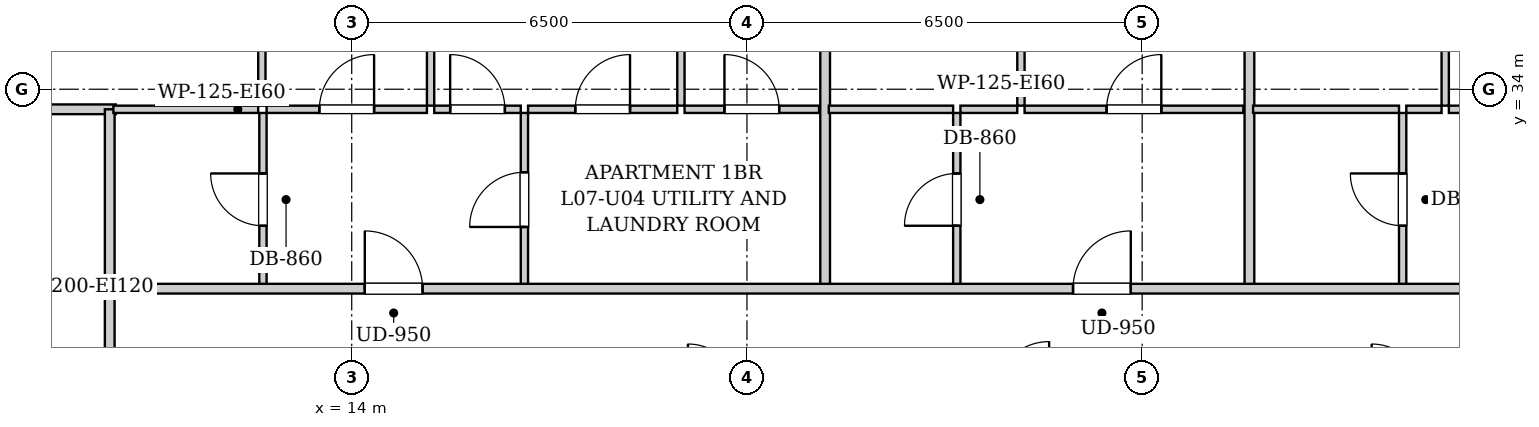
"""IFC4 building model, lengths in metres.
Left out: names, types, materials, properties, quantities, classifications, styles, units other than length and angle.
Written with IfcOpenShell. Run it as: python <this file> out.ifc"""

import sys

from ifc_helpers import new_model, si_unit, direction, frame, frame_2d, origin, place, context, subcontext, project, spatial, rectangle, extrude, element, fill, save


model = new_model("IFC4")
c1 = context("Model", 3, precision=1e-05, world=origin(), true_north=direction((0.0, 1.0)))
c2 = subcontext(c1, "Body", "Model", "MODEL_VIEW")
j1 = project(units=[si_unit("LENGTHUNIT", "METRE"), si_unit("PLANEANGLEUNIT", "RADIAN")], contexts=[c1])
p1 = place(None, origin())
s1 = spatial("IfcSite", under=j1, at=p1, CompositionType="ELEMENT")
p2 = place(p1, origin())
s2 = spatial("IfcBuilding", under=s1, at=p2, CompositionType="ELEMENT")
p3 = place(p2, frame((0.0, 0.0, 32.2)))
s3 = spatial("IfcBuildingStorey", under=s2, at=p3, CompositionType="ELEMENT", Elevation=32.2)
p4 = place(p3, frame((10.02, 28.98, 0.0), z_axis=(0.0, 0.0, 1.0), x_axis=(0.0, 1.0, 0.0)))
e1 = element("IfcWall", 1, at=p4, inside=s3, PredefinedType="PARTITIONING", context=c2, shape_type="SweptSolid", body=[
    extrude(rectangle(XDim=1.74, YDim=0.16, at=frame_2d((0.87, 0.0))), origin(), (0.0, 0.0, 1.0), 2.94),
])
p5 = place(p3, frame((7.78, 33.67, 0.0), z_axis=(0.0, 0.0, 1.0), x_axis=(1.0, 0.0, 0.0)))
e2 = element("IfcWall", 2, at=p5, inside=s3, PredefinedType="PARTITIONING", context=c2, shape_type="SweptSolid", body=[
    extrude(rectangle(XDim=2.34, YDim=0.16, at=frame_2d((1.17, 0.0))), origin(), (0.0, 0.0, 1.0), 2.94),
])
p6 = place(p3, frame((10.02, 30.76, 0.0), z_axis=(0.0, 0.0, 1.0), x_axis=(0.0, 1.0, 0.0)))
e3 = element("IfcWall", 3, at=p6, inside=s3, PredefinedType="PARTITIONING", context=c2, shape_type="SweptSolid", body=[
    extrude(rectangle(XDim=2.91, YDim=0.16, at=frame_2d((1.455, 0.0))), origin(), (0.0, 0.0, 1.0), 2.94),
])
p7 = place(p3, frame((12.54, 30.76, 0.0), z_axis=(0.0, 0.0, 1.0), x_axis=(0.0, 1.0, 0.0)))
e4 = element("IfcWall", 4, at=p7, inside=s3, PredefinedType="PARTITIONING", context=c2, shape_type="SweptSolid", body=[
    extrude(rectangle(XDim=2.85, YDim=0.12, at=frame_2d((1.425, 0.0))), origin(), (0.0, 0.0, 1.0), 2.94),
])
p8 = place(p7, frame((0.995, 0.0, 0.0)))
e5 = element("IfcOpeningElement", 5, at=p8, cuts=e4, PredefinedType="OPENING", context=c2, shape_type="SweptSolid", body=[
    extrude(rectangle(XDim=0.86, YDim=2.05, at=frame_2d((0.43, 1.025))), frame((0.0, 0.07, 0.0), z_axis=(0.0, -1.0, 0.0), x_axis=(1.0, 0.0, 0.0)), (0.0, 0.0, 1.0), 0.14),
])
p9 = place(p3, frame((10.08, 33.67, 0.0), z_axis=(0.0, 0.0, 1.0), x_axis=(1.0, 0.0, 0.0)))
e6 = element("IfcWall", 6, at=p9, inside=s3, PredefinedType="PARTITIONING", context=c2, shape_type="SweptSolid", body=[
    extrude(rectangle(XDim=2.382, YDim=0.12, at=frame_2d((1.191, 0.0))), origin(), (0.0, 0.0, 1.0), 2.94),
])
p10 = place(p3, frame((16.84, 30.76, 0.0), z_axis=(0.0, 0.0, 1.0), x_axis=(0.0, 1.0, 0.0)))
e7 = element("IfcWall", 7, at=p10, inside=s3, PredefinedType="PARTITIONING", context=c2, shape_type="SweptSolid", body=[
    extrude(rectangle(XDim=2.85, YDim=0.12, at=frame_2d((1.425, 0.0))), origin(), (0.0, 0.0, 1.0), 2.94),
])
p11 = place(p10, frame((0.975, 0.0, 0.0)))
e8 = element("IfcOpeningElement", 8, at=p11, cuts=e7, PredefinedType="OPENING", context=c2, shape_type="SweptSolid", body=[
    extrude(rectangle(XDim=0.9, YDim=2.05, at=frame_2d((0.45, 1.025))), frame((0.0, 0.07, 0.0), z_axis=(0.0, -1.0, 0.0), x_axis=(1.0, 0.0, 0.0)), (0.0, 0.0, 1.0), 0.14),
])
p12 = place(p3, frame((12.6, 33.67, 0.0), z_axis=(0.0, 0.0, 1.0), x_axis=(1.0, 0.0, 0.0)))
e9 = element("IfcWall", 9, at=p12, inside=s3, PredefinedType="PARTITIONING", context=c2, shape_type="SweptSolid", body=[
    extrude(rectangle(XDim=2.637, YDim=0.12, at=frame_2d((1.318, 0.0))), origin(), (0.0, 0.0, 1.0), 2.94),
])
p13 = place(p12, frame((0.868, 0.0, 0.0)))
e10 = element("IfcOpeningElement", 10, at=p13, cuts=e9, PredefinedType="OPENING", context=c2, shape_type="SweptSolid", body=[
    extrude(rectangle(XDim=0.9, YDim=2.05, at=frame_2d((0.45, 1.025))), frame((0.0, 0.07, 0.0), z_axis=(0.0, -1.0, 0.0), x_axis=(1.0, 0.0, 0.0)), (0.0, 0.0, 1.0), 0.14),
])
p14 = place(p3, frame((15.357, 33.67, 0.0), z_axis=(0.0, 0.0, 1.0), x_axis=(1.0, 0.0, 0.0)))
e11 = element("IfcWall", 11, at=p14, inside=s3, PredefinedType="PARTITIONING", context=c2, shape_type="SweptSolid", body=[
    extrude(rectangle(XDim=1.423, YDim=0.12, at=frame_2d((0.711, 0.0))), origin(), (0.0, 0.0, 1.0), 2.94),
])
p15 = place(p14, frame((0.262, 0.0, 0.0)))
e12 = element("IfcOpeningElement", 12, at=p15, cuts=e11, PredefinedType="OPENING", context=c2, shape_type="SweptSolid", body=[
    extrude(rectangle(XDim=0.9, YDim=2.05, at=frame_2d((0.45, 1.025))), frame((0.0, 0.07, 0.0), z_axis=(0.0, -1.0, 0.0), x_axis=(1.0, 0.0, 0.0)), (0.0, 0.0, 1.0), 0.14),
])
p16 = place(p3, frame((16.9, 33.67, 0.0), z_axis=(0.0, 0.0, 1.0), x_axis=(1.0, 0.0, 0.0)))
e13 = element("IfcWall", 13, at=p16, inside=s3, PredefinedType="PARTITIONING", context=c2, shape_type="SweptSolid", body=[
    extrude(rectangle(XDim=2.454, YDim=0.12, at=frame_2d((1.227, 0.0))), origin(), (0.0, 0.0, 1.0), 2.94),
])
p17 = place(p16, frame((0.777, 0.0, 0.0)))
e14 = element("IfcOpeningElement", 14, at=p17, cuts=e13, PredefinedType="OPENING", context=c2, shape_type="SweptSolid", body=[
    extrude(rectangle(XDim=0.9, YDim=2.05, at=frame_2d((0.45, 1.025))), frame((0.0, 0.07, 0.0), z_axis=(0.0, -1.0, 0.0), x_axis=(1.0, 0.0, 0.0)), (0.0, 0.0, 1.0), 0.14),
])
p18 = place(p3, frame((19.474, 33.67, 0.0), z_axis=(0.0, 0.0, 1.0), x_axis=(1.0, 0.0, 0.0)))
e15 = element("IfcWall", 15, at=p18, inside=s3, PredefinedType="PARTITIONING", context=c2, shape_type="SweptSolid", body=[
    extrude(rectangle(XDim=2.212, YDim=0.12, at=frame_2d((1.106, 0.0))), origin(), (0.0, 0.0, 1.0), 2.94),
])
p19 = place(p18, frame((0.656, 0.0, 0.0)))
e16 = element("IfcOpeningElement", 16, at=p19, cuts=e15, PredefinedType="OPENING", context=c2, shape_type="SweptSolid", body=[
    extrude(rectangle(XDim=0.9, YDim=2.05, at=frame_2d((0.45, 1.025))), frame((0.0, 0.07, 0.0), z_axis=(0.0, -1.0, 0.0), x_axis=(1.0, 0.0, 0.0)), (0.0, 0.0, 1.0), 0.14),
])
p20 = place(p3, frame((12.522, 33.73, 0.0), z_axis=(0.0, 0.0, 1.0), x_axis=(0.0, 1.0, 0.0)))
e17 = element("IfcWall", 17, at=p20, inside=s3, PredefinedType="PARTITIONING", context=c2, shape_type="SweptSolid", body=[
    extrude(rectangle(XDim=13.59, YDim=0.12, at=frame_2d((6.795, 0.0))), origin(), (0.0, 0.0, 1.0), 2.94),
])
p21 = place(p20, frame((6.33, 0.0, 0.0)))
e18 = element("IfcOpeningElement", 18, at=p21, cuts=e17, PredefinedType="OPENING", context=c2, shape_type="SweptSolid", body=[
    extrude(rectangle(XDim=0.9, YDim=2.05, at=frame_2d((0.45, 1.025))), frame((0.0, 0.07, 0.0), z_axis=(0.0, -1.0, 0.0), x_axis=(1.0, 0.0, 0.0)), (0.0, 0.0, 1.0), 0.14),
])
p22 = place(p3, frame((15.297, 33.73, 0.0), z_axis=(0.0, 0.0, 1.0), x_axis=(0.0, 1.0, 0.0)))
e19 = element("IfcWall", 19, at=p22, inside=s3, PredefinedType="PARTITIONING", context=c2, shape_type="SweptSolid", body=[
    extrude(rectangle(XDim=13.59, YDim=0.12, at=frame_2d((6.795, 0.0))), origin(), (0.0, 0.0, 1.0), 2.94),
])
p23 = place(p22, frame((6.33, 0.0, 0.0)))
e20 = element("IfcOpeningElement", 20, at=p23, cuts=e19, PredefinedType="OPENING", context=c2, shape_type="SweptSolid", body=[
    extrude(rectangle(XDim=0.9, YDim=2.05, at=frame_2d((0.45, 1.025))), frame((0.0, 0.07, 0.0), z_axis=(0.0, -1.0, 0.0), x_axis=(1.0, 0.0, 0.0)), (0.0, 0.0, 1.0), 0.14),
])
p24 = place(p3, frame((19.414, 33.73, 0.0), z_axis=(0.0, 0.0, 1.0), x_axis=(0.0, 1.0, 0.0)))
e21 = element("IfcWall", 21, at=p24, inside=s3, PredefinedType="PARTITIONING", context=c2, shape_type="SweptSolid", body=[
    extrude(rectangle(XDim=13.59, YDim=0.12, at=frame_2d((6.795, 0.0))), origin(), (0.0, 0.0, 1.0), 2.94),
])
p25 = place(p24, frame((6.33, 0.0, 0.0)))
e22 = element("IfcOpeningElement", 22, at=p25, cuts=e21, PredefinedType="OPENING", context=c2, shape_type="SweptSolid", body=[
    extrude(rectangle(XDim=0.9, YDim=2.05, at=frame_2d((0.45, 1.025))), frame((0.0, 0.07, 0.0), z_axis=(0.0, -1.0, 0.0), x_axis=(1.0, 0.0, 0.0)), (0.0, 0.0, 1.0), 0.14),
])
p26 = place(p3, frame((21.786, 30.76, 0.0), z_axis=(0.0, 0.0, 1.0), x_axis=(0.0, 1.0, 0.0)))
e23 = element("IfcWall", 23, at=p26, inside=s3, PredefinedType="PARTITIONING", context=c2, shape_type="SweptSolid", body=[
    extrude(rectangle(XDim=16.56, YDim=0.16, at=frame_2d((8.28, 0.0))), origin(), (0.0, 0.0, 1.0), 2.94),
])
p27 = place(p3, frame((23.951, 30.76, 0.0), z_axis=(0.0, 0.0, 1.0), x_axis=(0.0, 1.0, 0.0)))
e24 = element("IfcWall", 24, at=p27, inside=s3, PredefinedType="PARTITIONING", context=c2, shape_type="SweptSolid", body=[
    extrude(rectangle(XDim=2.85, YDim=0.12, at=frame_2d((1.425, 0.0))), origin(), (0.0, 0.0, 1.0), 2.94),
])
p28 = place(p27, frame((0.995, 0.0, 0.0)))
e25 = element("IfcOpeningElement", 25, at=p28, cuts=e24, PredefinedType="OPENING", context=c2, shape_type="SweptSolid", body=[
    extrude(rectangle(XDim=0.86, YDim=2.05, at=frame_2d((0.43, 1.025))), frame((0.0, 0.07, 0.0), z_axis=(0.0, -1.0, 0.0), x_axis=(1.0, 0.0, 0.0)), (0.0, 0.0, 1.0), 0.14),
])
p29 = place(p3, frame((21.846, 33.67, 0.0), z_axis=(0.0, 0.0, 1.0), x_axis=(1.0, 0.0, 0.0)))
e26 = element("IfcWall", 26, at=p29, inside=s3, PredefinedType="PARTITIONING", context=c2, shape_type="SweptSolid", body=[
    extrude(rectangle(XDim=2.045, YDim=0.12, at=frame_2d((1.022, 0.0))), origin(), (0.0, 0.0, 1.0), 2.94),
])
p30 = place(p3, frame((24.011, 33.67, 0.0), z_axis=(0.0, 0.0, 1.0), x_axis=(1.0, 0.0, 0.0)))
e27 = element("IfcWall", 27, at=p30, inside=s3, PredefinedType="PARTITIONING", context=c2, shape_type="SweptSolid", body=[
    extrude(rectangle(XDim=0.935, YDim=0.12, at=frame_2d((0.468, 0.0))), origin(), (0.0, 0.0, 1.0), 2.94),
])
p31 = place(p3, frame((25.066, 33.67, 0.0), z_axis=(0.0, 0.0, 1.0), x_axis=(1.0, 0.0, 0.0)))
e28 = element("IfcWall", 28, at=p31, inside=s3, PredefinedType="PARTITIONING", context=c2, shape_type="SweptSolid", body=[
    extrude(rectangle(XDim=3.598, YDim=0.12, at=frame_2d((1.799, 0.0))), origin(), (0.0, 0.0, 1.0), 2.94),
])
p32 = place(p31, frame((1.349, 0.0, 0.0)))
e29 = element("IfcOpeningElement", 29, at=p32, cuts=e28, PredefinedType="OPENING", context=c2, shape_type="SweptSolid", body=[
    extrude(rectangle(XDim=0.9, YDim=2.05, at=frame_2d((0.45, 1.025))), frame((0.0, 0.07, 0.0), z_axis=(0.0, -1.0, 0.0), x_axis=(1.0, 0.0, 0.0)), (0.0, 0.0, 1.0), 0.14),
])
p33 = place(p3, frame((25.006, 33.73, 0.0), z_axis=(0.0, 0.0, 1.0), x_axis=(0.0, 1.0, 0.0)))
e30 = element("IfcWall", 30, at=p33, inside=s3, PredefinedType="PARTITIONING", context=c2, shape_type="SweptSolid", body=[
    extrude(rectangle(XDim=13.59, YDim=0.12, at=frame_2d((6.795, 0.0))), origin(), (0.0, 0.0, 1.0), 2.94),
])
p34 = place(p33, frame((6.33, 0.0, 0.0)))
e31 = element("IfcOpeningElement", 31, at=p34, cuts=e30, PredefinedType="OPENING", context=c2, shape_type="SweptSolid", body=[
    extrude(rectangle(XDim=0.9, YDim=2.05, at=frame_2d((0.45, 1.025))), frame((0.0, 0.07, 0.0), z_axis=(0.0, -1.0, 0.0), x_axis=(1.0, 0.0, 0.0)), (0.0, 0.0, 1.0), 0.14),
])
p35 = place(p3, frame((28.764, 30.76, 0.0), z_axis=(0.0, 0.0, 1.0), x_axis=(0.0, 1.0, 0.0)))
e32 = element("IfcWall", 32, at=p35, inside=s3, PredefinedType="PARTITIONING", context=c2, shape_type="SweptSolid", body=[
    extrude(rectangle(XDim=16.56, YDim=0.16, at=frame_2d((8.28, 0.0))), origin(), (0.0, 0.0, 1.0), 2.94),
])
p36 = place(p3, frame((31.284, 30.76, 0.0), z_axis=(0.0, 0.0, 1.0), x_axis=(0.0, 1.0, 0.0)))
e33 = element("IfcWall", 33, at=p36, inside=s3, PredefinedType="PARTITIONING", context=c2, shape_type="SweptSolid", body=[
    extrude(rectangle(XDim=2.85, YDim=0.12, at=frame_2d((1.425, 0.0))), origin(), (0.0, 0.0, 1.0), 2.94),
])
p37 = place(p36, frame((0.995, 0.0, 0.0)))
e34 = element("IfcOpeningElement", 34, at=p37, cuts=e33, PredefinedType="OPENING", context=c2, shape_type="SweptSolid", body=[
    extrude(rectangle(XDim=0.86, YDim=2.05, at=frame_2d((0.43, 1.025))), frame((0.0, 0.07, 0.0), z_axis=(0.0, -1.0, 0.0), x_axis=(1.0, 0.0, 0.0)), (0.0, 0.0, 1.0), 0.14),
])
p38 = place(p3, frame((28.824, 33.67, 0.0), z_axis=(0.0, 0.0, 1.0), x_axis=(1.0, 0.0, 0.0)))
e35 = element("IfcWall", 35, at=p38, inside=s3, PredefinedType="PARTITIONING", context=c2, shape_type="SweptSolid", body=[
    extrude(rectangle(XDim=2.4, YDim=0.12, at=frame_2d((1.2, 0.0))), origin(), (0.0, 0.0, 1.0), 2.94),
])
p39 = place(p3, frame((31.344, 33.67, 0.0), z_axis=(0.0, 0.0, 1.0), x_axis=(1.0, 0.0, 0.0)))
e36 = element("IfcWall", 36, at=p39, inside=s3, PredefinedType="PARTITIONING", context=c2, shape_type="SweptSolid", body=[
    extrude(rectangle(XDim=0.58, YDim=0.12, at=frame_2d((0.29, 0.0))), origin(), (0.0, 0.0, 1.0), 2.94),
])
p40 = place(p3, frame((32.044, 33.67, 0.0), z_axis=(0.0, 0.0, 1.0), x_axis=(1.0, 0.0, 0.0)))
e37 = element("IfcWall", 37, at=p40, inside=s3, PredefinedType="PARTITIONING", context=c2, shape_type="SweptSolid", body=[
    extrude(rectangle(XDim=3.1, YDim=0.12, at=frame_2d((1.55, 0.0))), origin(), (0.0, 0.0, 1.0), 2.94),
])
p41 = place(p40, frame((1.1, 0.0, 0.0)))
e38 = element("IfcOpeningElement", 38, at=p41, cuts=e37, PredefinedType="OPENING", context=c2, shape_type="SweptSolid", body=[
    extrude(rectangle(XDim=0.9, YDim=2.05, at=frame_2d((0.45, 1.025))), frame((0.0, 0.07, 0.0), z_axis=(0.0, -1.0, 0.0), x_axis=(1.0, 0.0, 0.0)), (0.0, 0.0, 1.0), 0.14),
])
p42 = place(p3, frame((31.984, 33.73, 0.0), z_axis=(0.0, 0.0, 1.0), x_axis=(0.0, 1.0, 0.0)))
e39 = element("IfcWall", 39, at=p42, inside=s3, PredefinedType="PARTITIONING", context=c2, shape_type="SweptSolid", body=[
    extrude(rectangle(XDim=13.59, YDim=0.12, at=frame_2d((6.795, 0.0))), origin(), (0.0, 0.0, 1.0), 2.94),
])
p43 = place(p42, frame((6.33, 0.0, 0.0)))
e40 = element("IfcOpeningElement", 40, at=p43, cuts=e39, PredefinedType="OPENING", context=c2, shape_type="SweptSolid", body=[
    extrude(rectangle(XDim=0.9, YDim=2.05, at=frame_2d((0.45, 1.025))), frame((0.0, 0.07, 0.0), z_axis=(0.0, -1.0, 0.0), x_axis=(1.0, 0.0, 0.0)), (0.0, 0.0, 1.0), 0.14),
])
p44 = place(p3, frame((10.05, 30.72, 0.0), z_axis=(0.0, 0.0, 1.0), x_axis=(1.0, 0.0, 0.0)))
e41 = element("IfcWall", 41, at=p44, inside=s3, PredefinedType="PARTITIONING", context=c2, shape_type="SweptSolid", body=[
    extrude(rectangle(XDim=33.9, YDim=0.16, at=frame_2d((16.95, 0.0))), origin(), (0.0, 0.0, 1.0), 2.94),
])
p45 = place(p44, frame((4.165, 0.0, 0.0)))
e42 = element("IfcOpeningElement", 42, at=p45, cuts=e41, PredefinedType="OPENING", context=c2, shape_type="SweptSolid", body=[
    extrude(rectangle(XDim=0.95, YDim=2.1, at=frame_2d((0.475, 1.05))), frame((0.0, 0.09, 0.0), z_axis=(0.0, -1.0, 0.0), x_axis=(1.0, 0.0, 0.0)), (0.0, 0.0, 1.0), 0.18),
])
p46 = place(p44, frame((15.813, 0.0, 0.0)))
e43 = element("IfcOpeningElement", 43, at=p46, cuts=e41, PredefinedType="OPENING", context=c2, shape_type="SweptSolid", body=[
    extrude(rectangle(XDim=0.95, YDim=2.1, at=frame_2d((0.475, 1.05))), frame((0.0, 0.09, 0.0), z_axis=(0.0, -1.0, 0.0), x_axis=(1.0, 0.0, 0.0)), (0.0, 0.0, 1.0), 0.18),
])
p47 = place(p44, frame((23.91, 0.0, 0.0)))
e44 = element("IfcOpeningElement", 44, at=p47, cuts=e41, PredefinedType="OPENING", context=c2, shape_type="SweptSolid", body=[
    extrude(rectangle(XDim=0.95, YDim=2.1, at=frame_2d((0.475, 1.05))), frame((0.0, 0.09, 0.0), z_axis=(0.0, -1.0, 0.0), x_axis=(1.0, 0.0, 0.0)), (0.0, 0.0, 1.0), 0.18),
])
p48 = place(p8, origin())
e45 = element("IfcDoor", 45, at=p48, inside=s3, OperationType="SINGLE_SWING_RIGHT", PredefinedType="DOOR", context=c2, shape_type="SweptSolid", body=[
    extrude(rectangle(XDim=0.86, YDim=2.05, at=frame_2d((0.43, 1.025))), frame((0.0, 0.025, 0.0), z_axis=(0.0, -1.0, 0.0), x_axis=(1.0, 0.0, 0.0)), (0.0, 0.0, 1.0), 0.05),
])
fill(e5, e45)
p49 = place(p11, origin())
e46 = element("IfcDoor", 46, at=p49, inside=s3, OperationType="SINGLE_SWING_LEFT", PredefinedType="DOOR", context=c2, shape_type="SweptSolid", body=[
    extrude(rectangle(XDim=0.9, YDim=2.05, at=frame_2d((0.45, 1.025))), frame((0.0, 0.025, 0.0), z_axis=(0.0, -1.0, 0.0), x_axis=(1.0, 0.0, 0.0)), (0.0, 0.0, 1.0), 0.05),
])
fill(e8, e46)
p50 = place(p13, origin())
e47 = element("IfcDoor", 47, at=p50, inside=s3, OperationType="SINGLE_SWING_RIGHT", PredefinedType="DOOR", context=c2, shape_type="SweptSolid", body=[
    extrude(rectangle(XDim=0.9, YDim=2.05, at=frame_2d((0.45, 1.025))), frame((0.0, 0.025, 0.0), z_axis=(0.0, -1.0, 0.0), x_axis=(1.0, 0.0, 0.0)), (0.0, 0.0, 1.0), 0.05),
])
fill(e10, e47)
p51 = place(p15, origin())
e48 = element("IfcDoor", 48, at=p51, inside=s3, OperationType="SINGLE_SWING_LEFT", PredefinedType="DOOR", context=c2, shape_type="SweptSolid", body=[
    extrude(rectangle(XDim=0.9, YDim=2.05, at=frame_2d((0.45, 1.025))), frame((0.0, 0.025, 0.0), z_axis=(0.0, -1.0, 0.0), x_axis=(1.0, 0.0, 0.0)), (0.0, 0.0, 1.0), 0.05),
])
fill(e12, e48)
p52 = place(p17, origin())
e49 = element("IfcDoor", 49, at=p52, inside=s3, OperationType="SINGLE_SWING_RIGHT", PredefinedType="DOOR", context=c2, shape_type="SweptSolid", body=[
    extrude(rectangle(XDim=0.9, YDim=2.05, at=frame_2d((0.45, 1.025))), frame((0.0, 0.025, 0.0), z_axis=(0.0, -1.0, 0.0), x_axis=(1.0, 0.0, 0.0)), (0.0, 0.0, 1.0), 0.05),
])
fill(e14, e49)
p53 = place(p19, origin())
e50 = element("IfcDoor", 50, at=p53, inside=s3, OperationType="SINGLE_SWING_LEFT", PredefinedType="DOOR", context=c2, shape_type="SweptSolid", body=[
    extrude(rectangle(XDim=0.9, YDim=2.05, at=frame_2d((0.45, 1.025))), frame((0.0, 0.025, 0.0), z_axis=(0.0, -1.0, 0.0), x_axis=(1.0, 0.0, 0.0)), (0.0, 0.0, 1.0), 0.05),
])
fill(e16, e50)
p54 = place(p28, origin())
e51 = element("IfcDoor", 51, at=p54, inside=s3, OperationType="SINGLE_SWING_LEFT", PredefinedType="DOOR", context=c2, shape_type="SweptSolid", body=[
    extrude(rectangle(XDim=0.86, YDim=2.05, at=frame_2d((0.43, 1.025))), frame((0.0, 0.025, 0.0), z_axis=(0.0, -1.0, 0.0), x_axis=(1.0, 0.0, 0.0)), (0.0, 0.0, 1.0), 0.05),
])
fill(e25, e51)
p55 = place(p32, origin())
e52 = element("IfcDoor", 52, at=p55, inside=s3, OperationType="SINGLE_SWING_RIGHT", PredefinedType="DOOR", context=c2, shape_type="SweptSolid", body=[
    extrude(rectangle(XDim=0.9, YDim=2.05, at=frame_2d((0.45, 1.025))), frame((0.0, 0.025, 0.0), z_axis=(0.0, -1.0, 0.0), x_axis=(1.0, 0.0, 0.0)), (0.0, 0.0, 1.0), 0.05),
])
fill(e29, e52)
p56 = place(p37, origin())
e53 = element("IfcDoor", 53, at=p56, inside=s3, OperationType="SINGLE_SWING_RIGHT", PredefinedType="DOOR", context=c2, shape_type="SweptSolid", body=[
    extrude(rectangle(XDim=0.86, YDim=2.05, at=frame_2d((0.43, 1.025))), frame((0.0, 0.025, 0.0), z_axis=(0.0, -1.0, 0.0), x_axis=(1.0, 0.0, 0.0)), (0.0, 0.0, 1.0), 0.05),
])
fill(e34, e53)
p57 = place(p45, origin())
e54 = element("IfcDoor", 54, at=p57, inside=s3, OperationType="SINGLE_SWING_LEFT", PredefinedType="DOOR", context=c2, shape_type="SweptSolid", body=[
    extrude(rectangle(XDim=0.95, YDim=2.1, at=frame_2d((0.475, 1.05))), frame((0.0, 0.025, 0.0), z_axis=(0.0, -1.0, 0.0), x_axis=(1.0, 0.0, 0.0)), (0.0, 0.0, 1.0), 0.05),
])
fill(e42, e54)
p58 = place(p46, origin())
e55 = element("IfcDoor", 55, at=p58, inside=s3, OperationType="SINGLE_SWING_RIGHT", PredefinedType="DOOR", context=c2, shape_type="SweptSolid", body=[
    extrude(rectangle(XDim=0.95, YDim=2.1, at=frame_2d((0.475, 1.05))), frame((0.0, 0.025, 0.0), z_axis=(0.0, -1.0, 0.0), x_axis=(1.0, 0.0, 0.0)), (0.0, 0.0, 1.0), 0.05),
])
fill(e43, e55)
save(model, sys.argv[1])
